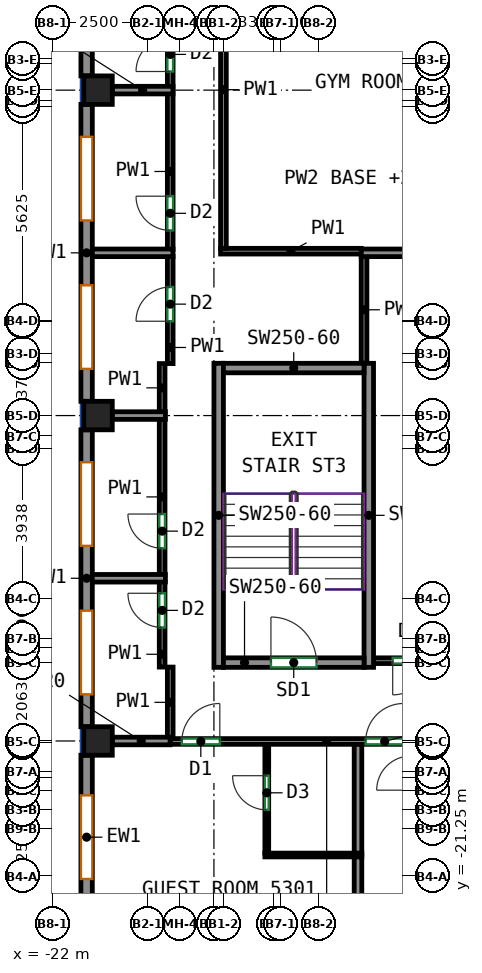
"""IFC4 building model, lengths in metres.
Left out: names, types, materials, properties, quantities, classifications, styles, units other than length and angle.
Written with IfcOpenShell. Run it as: python <this file> out.ifc"""

import sys

from ifc_helpers import new_model, si_unit, direction, frame, frame_2d, origin, origin_2d, place, context, subcontext, project, spatial, rectangle, extrude, source, transform, mapped, element, fill, save


model = new_model("IFC4")
c1 = context("Model", 3, precision=1e-05, world=origin(), true_north=direction((0.0, 1.0)))
c2 = subcontext(c1, "Body", "Model", "MODEL_VIEW")
j1 = project(units=[si_unit("LENGTHUNIT", "METRE"), si_unit("PLANEANGLEUNIT", "RADIAN")], contexts=[c1])
p1 = place(None, origin())
s1 = spatial("IfcSite", under=j1, at=p1, CompositionType="ELEMENT")
p2 = place(p1, origin())
s2 = spatial("IfcBuilding", under=s1, at=p2, CompositionType="ELEMENT")
p3 = place(p2, frame((0.0, 0.0, 216.9)))
s3 = spatial("IfcBuildingStorey", under=s2, at=p3, CompositionType="ELEMENT", Elevation=216.9)
m1 = source(origin(), c2, "Body", "SweptSolid", [
    extrude(rectangle(XDim=0.75, YDim=0.75, at=origin_2d()), origin(), (0.0, 0.0, 1.0), 3.12),
])
for number, where, z_axis, x_axis in (
    (1, (-20.8, -17.688, 0.0), (0.0, 0.0, 1.0), (1.0, 0.0, 0.0)),
    (2, (-20.8, -9.125, 0.0), (0.0, 0.0, 1.0), (1.0, 0.0, 0.0)),
    (3, (-20.8, -0.562, 0.0), (0.0, 0.0, 1.0), (1.0, 0.0, 0.0)),
):
    element("IfcColumn", number, at=place(p3, frame(where, z_axis=z_axis, x_axis=x_axis)), inside=s3, PredefinedType="COLUMN", context=c2, shape_type="MappedRepresentation", body=[
        mapped(m1, transform((0.0, 0.0, 0.0))),
    ])
m2 = source(origin(), c2, "Body", "SweptSolid", [
    extrude(rectangle(XDim=8.0, YDim=0.25, at=frame_2d((4.0, 0.0))), origin(), (0.0, 0.0, 1.0), 3.12),
])
for number, where, z_axis, x_axis in (
    (4, (-17.625, -15.75, 0.0), (0.0, 0.0, 1.0), (0.0, 1.0, 0.0)),
    (5, (-13.675, -15.75, 0.0), (0.0, 0.0, 1.0), (0.0, 1.0, 0.0)),
):
    element("IfcWall", number, at=place(p3, frame(where, z_axis=z_axis, x_axis=x_axis)), inside=s3, PredefinedType="SHEAR", context=c2, shape_type="MappedRepresentation", body=[
        mapped(m2, transform((0.0, 0.0, 0.0))),
    ])
m3 = source(origin(), c2, "Body", "SweptSolid", [
    extrude(rectangle(XDim=3.7, YDim=0.25, at=frame_2d((1.85, 0.0))), origin(), (0.0, 0.0, 1.0), 3.12),
])
p4 = place(p3, frame((-17.5, -15.625, 0.0), z_axis=(0.0, 0.0, 1.0), x_axis=(1.0, 0.0, 0.0)))
e6 = element("IfcWall", 6, at=p4, inside=s3, PredefinedType="SHEAR", context=c2, shape_type="MappedRepresentation", body=[
    mapped(m3, transform((0.0, 0.0, 0.0))),
])
p5 = place(p4, frame((1.25, 0.0, 0.0)))
e7 = element("IfcOpeningElement", 7, at=p5, cuts=e6, PredefinedType="OPENING", context=c2, shape_type="SweptSolid", body=[
    extrude(rectangle(XDim=1.2, YDim=2.1, at=frame_2d((0.6, 1.05))), frame((0.0, 0.135, 0.0), z_axis=(0.0, -1.0, 0.0), x_axis=(1.0, 0.0, 0.0)), (0.0, 0.0, 1.0), 0.27),
])
p6 = place(p3, frame((-17.5, -7.875, 0.0), z_axis=(0.0, 0.0, 1.0), x_axis=(1.0, 0.0, 0.0)))
e8 = element("IfcWall", 8, at=p6, inside=s3, PredefinedType="SHEAR", context=c2, shape_type="MappedRepresentation", body=[
    mapped(m3, transform((0.0, 0.0, 0.0))),
])
m4 = source(origin(), c2, "Body", "SweptSolid", [
    extrude(rectangle(XDim=7.812, YDim=0.3, at=frame_2d((3.906, 0.0))), origin(), (0.0, 0.0, 1.0), 3.12),
])
p7 = place(p3, frame((-21.1, 7.625, 0.0), z_axis=(0.0, 0.0, 1.0), x_axis=(0.0, -1.0, 0.0)))
e9 = element("IfcWall", 9, at=p7, inside=s3, PredefinedType="SOLIDWALL", context=c2, shape_type="MappedRepresentation", body=[
    mapped(m4, transform((0.0, 0.0, 0.0))),
])
p8 = place(p7, frame((0.853, 0.0, 0.85)))
e10 = element("IfcOpeningElement", 10, at=p8, cuts=e9, PredefinedType="OPENING", context=c2, shape_type="SweptSolid", body=[
    extrude(rectangle(XDim=2.2, YDim=1.95, at=frame_2d((1.1, 0.975))), frame((0.0, 0.16, 0.0), z_axis=(0.0, -1.0, 0.0), x_axis=(1.0, 0.0, 0.0)), (0.0, 0.0, 1.0), 0.32),
])
p9 = place(p7, frame((4.759, 0.0, 0.85)))
e11 = element("IfcOpeningElement", 11, at=p9, cuts=e9, PredefinedType="OPENING", context=c2, shape_type="SweptSolid", body=[
    extrude(rectangle(XDim=2.2, YDim=1.95, at=frame_2d((1.1, 0.975))), frame((0.0, 0.16, 0.0), z_axis=(0.0, -1.0, 0.0), x_axis=(1.0, 0.0, 0.0)), (0.0, 0.0, 1.0), 0.32),
])
p10 = place(p3, frame((-21.1, -0.938, 0.0), z_axis=(0.0, 0.0, 1.0), x_axis=(0.0, -1.0, 0.0)))
e12 = element("IfcWall", 12, at=p10, inside=s3, PredefinedType="SOLIDWALL", context=c2, shape_type="MappedRepresentation", body=[
    mapped(m4, transform((0.0, 0.0, 0.0))),
])
p11 = place(p10, frame((0.853, 0.0, 0.85)))
e13 = element("IfcOpeningElement", 13, at=p11, cuts=e12, PredefinedType="OPENING", context=c2, shape_type="SweptSolid", body=[
    extrude(rectangle(XDim=2.2, YDim=1.95, at=frame_2d((1.1, 0.975))), frame((0.0, 0.16, 0.0), z_axis=(0.0, -1.0, 0.0), x_axis=(1.0, 0.0, 0.0)), (0.0, 0.0, 1.0), 0.32),
])
p12 = place(p10, frame((4.76, 0.0, 0.85)))
e14 = element("IfcOpeningElement", 14, at=p12, cuts=e12, PredefinedType="OPENING", context=c2, shape_type="SweptSolid", body=[
    extrude(rectangle(XDim=2.2, YDim=1.95, at=frame_2d((1.1, 0.975))), frame((0.0, 0.16, 0.0), z_axis=(0.0, -1.0, 0.0), x_axis=(1.0, 0.0, 0.0)), (0.0, 0.0, 1.0), 0.32),
])
p13 = place(p3, frame((-21.1, -9.5, 0.0), z_axis=(0.0, 0.0, 1.0), x_axis=(0.0, -1.0, 0.0)))
e15 = element("IfcWall", 15, at=p13, inside=s3, PredefinedType="SOLIDWALL", context=c2, shape_type="MappedRepresentation", body=[
    mapped(m4, transform((0.0, 0.0, 0.0))),
])
p14 = place(p13, frame((0.853, 0.0, 0.85)))
e16 = element("IfcOpeningElement", 16, at=p14, cuts=e15, PredefinedType="OPENING", context=c2, shape_type="SweptSolid", body=[
    extrude(rectangle(XDim=2.2, YDim=1.95, at=frame_2d((1.1, 0.975))), frame((0.0, 0.16, 0.0), z_axis=(0.0, -1.0, 0.0), x_axis=(1.0, 0.0, 0.0)), (0.0, 0.0, 1.0), 0.32),
])
p15 = place(p13, frame((4.759, 0.0, 0.85)))
e17 = element("IfcOpeningElement", 17, at=p15, cuts=e15, PredefinedType="OPENING", context=c2, shape_type="SweptSolid", body=[
    extrude(rectangle(XDim=2.2, YDim=1.95, at=frame_2d((1.1, 0.975))), frame((0.0, 0.16, 0.0), z_axis=(0.0, -1.0, 0.0), x_axis=(1.0, 0.0, 0.0)), (0.0, 0.0, 1.0), 0.32),
])
m5 = source(origin(), c2, "Body", "SweptSolid", [
    extrude(rectangle(XDim=4.312, YDim=0.3, at=frame_2d((2.156, 0.0))), origin(), (0.0, 0.0, 1.0), 3.12),
])
p16 = place(p3, frame((-21.1, -18.062, 0.0), z_axis=(0.0, 0.0, 1.0), x_axis=(0.0, -1.0, 0.0)))
e18 = element("IfcWall", 18, at=p16, inside=s3, PredefinedType="SOLIDWALL", context=c2, shape_type="MappedRepresentation", body=[
    mapped(m5, transform((0.0, 0.0, 0.0))),
])
p17 = place(p16, frame((1.056, 0.0, 0.85)))
e19 = element("IfcOpeningElement", 19, at=p17, cuts=e18, PredefinedType="OPENING", context=c2, shape_type="SweptSolid", body=[
    extrude(rectangle(XDim=2.2, YDim=1.95, at=frame_2d((1.1, 0.975))), frame((0.0, 0.16, 0.0), z_axis=(0.0, -1.0, 0.0), x_axis=(1.0, 0.0, 0.0)), (0.0, 0.0, 1.0), 0.32),
])
p18 = place(p3, frame((-18.9, -17.7, 0.0), z_axis=(0.0, 0.0, 1.0), x_axis=(1.0, 0.0, 0.0)))
e20 = element("IfcWall", 20, at=p18, inside=s3, PredefinedType="PARTITIONING", context=c2, shape_type="SweptSolid", body=[
    extrude(rectangle(XDim=8.233, YDim=0.15, at=frame_2d((4.116, 0.0))), origin(), (0.0, 0.0, 1.0), 2.52),
])
p19 = place(p18, frame((0.305, 0.0, 0.0)))
e21 = element("IfcOpeningElement", 21, at=p19, cuts=e20, PredefinedType="OPENING", context=c2, shape_type="SweptSolid", body=[
    extrude(rectangle(XDim=1.0, YDim=2.1, at=frame_2d((0.5, 1.05))), frame((0.0, 0.085, 0.0), z_axis=(0.0, -1.0, 0.0), x_axis=(1.0, 0.0, 0.0)), (0.0, 0.0, 1.0), 0.17),
])
p20 = place(p18, frame((5.143, 0.0, 0.0)))
e22 = element("IfcOpeningElement", 22, at=p20, cuts=e20, PredefinedType="OPENING", context=c2, shape_type="SweptSolid", body=[
    extrude(rectangle(XDim=1.0, YDim=2.1, at=frame_2d((0.5, 1.05))), frame((0.0, 0.085, 0.0), z_axis=(0.0, -1.0, 0.0), x_axis=(1.0, 0.0, 0.0)), (0.0, 0.0, 1.0), 0.17),
])
p21 = place(p3, frame((-18.9, -17.598, 0.0), z_axis=(0.0, 0.0, 1.0), x_axis=(0.0, 1.0, 0.0)))
e23 = element("IfcWall", 23, at=p21, inside=s3, PredefinedType="PARTITIONING", context=c2, shape_type="SweptSolid", body=[
    extrude(rectangle(XDim=1.855, YDim=0.15, at=frame_2d((0.927, 0.0))), origin(), (0.0, 0.0, 1.0), 3.12),
])
p22 = place(p3, frame((-19.113, -15.743, 0.0), z_axis=(0.0, 0.0, 1.0), x_axis=(0.0, 1.0, 0.0)))
e24 = element("IfcWall", 24, at=p22, inside=s3, PredefinedType="PARTITIONING", context=c2, shape_type="SweptSolid", body=[
    extrude(rectangle(XDim=2.247, YDim=0.15, at=frame_2d((1.124, 0.0))), origin(), (0.0, 0.0, 1.0), 3.12),
])
p23 = place(p22, frame((1.042, 0.0, 0.0)))
e25 = element("IfcOpeningElement", 25, at=p23, cuts=e24, PredefinedType="OPENING", context=c2, shape_type="SweptSolid", body=[
    extrude(rectangle(XDim=0.9, YDim=2.1, at=frame_2d((0.45, 1.05))), frame((0.0, 0.085, 0.0), z_axis=(0.0, -1.0, 0.0), x_axis=(1.0, 0.0, 0.0)), (0.0, 0.0, 1.0), 0.17),
])
p24 = place(p3, frame((-19.113, -13.316, 0.0), z_axis=(0.0, 0.0, 1.0), x_axis=(0.0, 1.0, 0.0)))
e26 = element("IfcWall", 26, at=p24, inside=s3, PredefinedType="PARTITIONING", context=c2, shape_type="SweptSolid", body=[
    extrude(rectangle(XDim=4.101, YDim=0.15, at=frame_2d((2.05, 0.0))), origin(), (0.0, 0.0, 1.0), 3.12),
])
p25 = place(p24, frame((0.7, 0.0, 0.0)))
e27 = element("IfcOpeningElement", 27, at=p25, cuts=e26, PredefinedType="OPENING", context=c2, shape_type="SweptSolid", body=[
    extrude(rectangle(XDim=0.9, YDim=2.1, at=frame_2d((0.45, 1.05))), frame((0.0, 0.085, 0.0), z_axis=(0.0, -1.0, 0.0), x_axis=(1.0, 0.0, 0.0)), (0.0, 0.0, 1.0), 0.17),
])
p26 = place(p3, frame((-18.9, -7.757, 0.0), z_axis=(0.0, 0.0, 1.0), x_axis=(0.0, 1.0, 0.0)))
e28 = element("IfcWall", 28, at=p26, inside=s3, PredefinedType="PARTITIONING", context=c2, shape_type="SweptSolid", body=[
    extrude(rectangle(XDim=2.824, YDim=0.15, at=frame_2d((1.412, 0.0))), origin(), (0.0, 0.0, 1.0), 3.12),
])
p27 = place(p26, frame((1.114, 0.0, 0.0)))
e29 = element("IfcOpeningElement", 29, at=p27, cuts=e28, PredefinedType="OPENING", context=c2, shape_type="SweptSolid", body=[
    extrude(rectangle(XDim=0.9, YDim=2.1, at=frame_2d((0.45, 1.05))), frame((0.0, 0.085, 0.0), z_axis=(0.0, -1.0, 0.0), x_axis=(1.0, 0.0, 0.0)), (0.0, 0.0, 1.0), 0.17),
])
p28 = place(p3, frame((-19.113, -9.035, 0.0), z_axis=(0.0, 0.0, 1.0), x_axis=(0.0, 1.0, 0.0)))
e30 = element("IfcWall", 30, at=p28, inside=s3, PredefinedType="PARTITIONING", context=c2, shape_type="SweptSolid", body=[
    extrude(rectangle(XDim=1.278, YDim=0.15, at=frame_2d((0.639, 0.0))), origin(), (0.0, 0.0, 1.0), 3.12),
])
p29 = place(p3, frame((-18.9, -4.753, 0.0), z_axis=(0.0, 0.0, 1.0), x_axis=(0.0, 1.0, 0.0)))
e31 = element("IfcWall", 31, at=p29, inside=s3, PredefinedType="PARTITIONING", context=c2, shape_type="SweptSolid", body=[
    extrude(rectangle(XDim=4.101, YDim=0.15, at=frame_2d((2.05, 0.0))), origin(), (0.0, 0.0, 1.0), 3.12),
])
p30 = place(p29, frame((0.5, 0.0, 0.0)))
e32 = element("IfcOpeningElement", 32, at=p30, cuts=e31, PredefinedType="OPENING", context=c2, shape_type="SweptSolid", body=[
    extrude(rectangle(XDim=0.9, YDim=2.1, at=frame_2d((0.45, 1.05))), frame((0.0, 0.085, 0.0), z_axis=(0.0, -1.0, 0.0), x_axis=(1.0, 0.0, 0.0)), (0.0, 0.0, 1.0), 0.17),
])
p31 = place(p3, frame((-18.9, -0.472, 0.0), z_axis=(0.0, 0.0, 1.0), x_axis=(0.0, 1.0, 0.0)))
e33 = element("IfcWall", 33, at=p31, inside=s3, PredefinedType="PARTITIONING", context=c2, shape_type="SweptSolid", body=[
    extrude(rectangle(XDim=4.101, YDim=0.15, at=frame_2d((2.05, 0.0))), origin(), (0.0, 0.0, 1.0), 3.12),
])
p32 = place(p31, frame((0.4, 0.0, 0.0)))
e34 = element("IfcOpeningElement", 34, at=p32, cuts=e33, PredefinedType="OPENING", context=c2, shape_type="SweptSolid", body=[
    extrude(rectangle(XDim=0.9, YDim=2.1, at=frame_2d((0.45, 1.05))), frame((0.0, 0.085, 0.0), z_axis=(0.0, -1.0, 0.0), x_axis=(1.0, 0.0, 0.0)), (0.0, 0.0, 1.0), 0.17),
])
p33 = place(p3, frame((-17.575, -4.8, 0.0), z_axis=(0.0, 0.0, 1.0), x_axis=(1.0, 0.0, 0.0)))
e35 = element("IfcWall", 35, at=p33, inside=s3, PredefinedType="PARTITIONING", context=c2, shape_type="SweptSolid", body=[
    extrude(rectangle(XDim=3.702, YDim=0.15, at=frame_2d((1.851, 0.0))), origin(), (0.0, 0.0, 1.0), 3.12),
])
p34 = place(p3, frame((-17.5, -4.725, 0.0), z_axis=(0.0, 0.0, 1.0), x_axis=(0.0, 1.0, 0.0)))
e36 = element("IfcWall", 36, at=p34, inside=s3, PredefinedType="PARTITIONING", context=c2, shape_type="SweptSolid", body=[
    extrude(rectangle(XDim=8.35, YDim=0.15, at=frame_2d((4.175, 0.0))), origin(), (0.0, 0.0, 1.0), 3.12),
])
p35 = place(p3, frame((-13.8, -7.75, 0.0), z_axis=(0.0, 0.0, 1.0), x_axis=(0.0, 1.0, 0.0)))
e37 = element("IfcWall", 37, at=p35, inside=s3, PredefinedType="PARTITIONING", context=c2, shape_type="SweptSolid", body=[
    extrude(rectangle(XDim=2.817, YDim=0.15, at=frame_2d((1.408, 0.0))), origin(), (0.0, 0.0, 1.0), 3.12),
])
p36 = place(p3, frame((-6.365, -15.575, 0.0), z_axis=(0.0, 0.0, 1.0), x_axis=(-1.0, 0.0, 0.0)))
e38 = element("IfcWall", 38, at=p36, inside=s3, PredefinedType="PARTITIONING", context=c2, shape_type="SweptSolid", body=[
    extrude(rectangle(XDim=7.185, YDim=0.15, at=frame_2d((3.593, 0.0))), origin(), (0.0, 0.0, 1.0), 3.12),
])
p37 = place(p36, frame((5.781, 0.0, 0.0)))
e39 = element("IfcOpeningElement", 39, at=p37, cuts=e38, PredefinedType="OPENING", context=c2, shape_type="SweptSolid", body=[
    extrude(rectangle(XDim=0.9, YDim=2.1, at=frame_2d((0.45, 1.05))), frame((0.0, 0.085, 0.0), z_axis=(0.0, -1.0, 0.0), x_axis=(1.0, 0.0, 0.0)), (0.0, 0.0, 1.0), 0.17),
])
p38 = place(p3, frame((-16.359, -20.638, 0.0), z_axis=(0.0, 0.0, 1.0), x_axis=(0.0, 1.0, 0.0)))
e40 = element("IfcWall", 40, at=p38, inside=s3, PredefinedType="PARTITIONING", context=c2, shape_type="SweptSolid", body=[
    extrude(rectangle(XDim=2.861, YDim=0.1, at=frame_2d((1.43, 0.0))), origin(), (0.0, 0.0, 1.0), 3.12),
])
p39 = place(p38, frame((1.137, 0.0, 0.0)))
e41 = element("IfcOpeningElement", 41, at=p39, cuts=e40, PredefinedType="OPENING", context=c2, shape_type="SweptSolid", body=[
    extrude(rectangle(XDim=0.9, YDim=2.1, at=frame_2d((0.45, 1.05))), frame((0.0, 0.06, 0.0), z_axis=(0.0, -1.0, 0.0), x_axis=(1.0, 0.0, 0.0)), (0.0, 0.0, 1.0), 0.12),
])
p40 = place(p3, frame((-16.409, -20.688, 0.0), z_axis=(0.0, 0.0, 1.0), x_axis=(1.0, 0.0, 0.0)))
e42 = element("IfcWall", 42, at=p40, inside=s3, PredefinedType="PARTITIONING", context=c2, shape_type="SweptSolid", body=[
    extrude(rectangle(XDim=2.55, YDim=0.1, at=frame_2d((1.275, 0.0))), origin(), (0.0, 0.0, 1.0), 3.12),
])
p41 = place(p3, frame((-13.959, -26.0, 0.0), z_axis=(0.0, 0.0, 1.0), x_axis=(0.0, 1.0, 0.0)))
e43 = element("IfcWall", 43, at=p41, inside=s3, PredefinedType="PARTITIONING", context=c2, shape_type="SweptSolid", body=[
    extrude(rectangle(XDim=5.262, YDim=0.2, at=frame_2d((2.631, 0.0))), origin(), (0.0, 0.0, 1.0), 3.12),
])
p42 = place(p3, frame((-20.425, -17.688, 0.0), z_axis=(0.0, 0.0, 1.0), x_axis=(1.0, 0.0, 0.0)))
e44 = element("IfcWall", 44, at=p42, inside=s3, PredefinedType="PARTITIONING", context=c2, shape_type="SweptSolid", body=[
    extrude(rectangle(XDim=1.523, YDim=0.2, at=frame_2d((0.761, 0.0))), origin(), (0.0, 0.0, 1.0), 2.52),
])
p43 = place(p3, frame((-13.959, -20.638, 0.0), z_axis=(0.0, 0.0, 1.0), x_axis=(0.0, 1.0, 0.0)))
e45 = element("IfcWall", 45, at=p43, inside=s3, PredefinedType="PARTITIONING", context=c2, shape_type="SweptSolid", body=[
    extrude(rectangle(XDim=2.861, YDim=0.2, at=frame_2d((1.43, 0.0))), origin(), (0.0, 0.0, 1.0), 3.12),
])
p44 = place(p3, frame((-19.027, -13.406, 0.0), z_axis=(0.0, 0.0, 1.0), x_axis=(-1.0, 0.0, 0.0)))
e46 = element("IfcWall", 46, at=p44, inside=s3, PredefinedType="PARTITIONING", context=c2, shape_type="SweptSolid", body=[
    extrude(rectangle(XDim=1.973, YDim=0.2, at=frame_2d((0.986, 0.0))), origin(), (0.0, 0.0, 1.0), 3.12),
])
p45 = place(p3, frame((-20.425, -9.125, 0.0), z_axis=(0.0, 0.0, 1.0), x_axis=(1.0, 0.0, 0.0)))
e47 = element("IfcWall", 47, at=p45, inside=s3, PredefinedType="PARTITIONING", context=c2, shape_type="SweptSolid", body=[
    extrude(rectangle(XDim=1.398, YDim=0.2, at=frame_2d((0.699, 0.0))), origin(), (0.0, 0.0, 1.0), 3.12),
])
p46 = place(p3, frame((-21.0, -4.843, 0.0), z_axis=(0.0, 0.0, 1.0), x_axis=(1.0, 0.0, 0.0)))
e48 = element("IfcWall", 48, at=p46, inside=s3, PredefinedType="PARTITIONING", context=c2, shape_type="SweptSolid", body=[
    extrude(rectangle(XDim=2.173, YDim=0.2, at=frame_2d((1.086, 0.0))), origin(), (0.0, 0.0, 1.0), 3.12),
])
p47 = place(p3, frame((-18.827, -0.562, 0.0), z_axis=(0.0, 0.0, 1.0), x_axis=(-1.0, 0.0, 0.0)))
e49 = element("IfcWall", 49, at=p47, inside=s3, PredefinedType="PARTITIONING", context=c2, shape_type="SweptSolid", body=[
    extrude(rectangle(XDim=1.598, YDim=0.2, at=frame_2d((0.799, 0.0))), origin(), (0.0, 0.0, 1.0), 2.52),
])
p48 = place(p3, frame((-13.873, -4.843, 0.0), z_axis=(0.0, 0.0, 1.0), x_axis=(1.0, 0.0, 0.0)))
e50 = element("IfcWall", 50, at=p48, inside=s3, PredefinedType="PARTITIONING", context=c2, shape_type="SweptSolid", body=[
    extrude(rectangle(XDim=30.146, YDim=0.2, at=frame_2d((15.073, 0.0))), origin(), (0.0, 0.0, 1.0), 3.12),
])
p49 = place(p11, origin())
e51 = element("IfcWindow", 51, at=p49, inside=s3, PartitioningType="SINGLE_PANEL", PredefinedType="WINDOW", context=c2, shape_type="SweptSolid", body=[
    extrude(rectangle(XDim=2.2, YDim=1.95, at=frame_2d((1.1, 0.975))), frame((0.0, 0.03, 0.0), z_axis=(0.0, -1.0, 0.0), x_axis=(1.0, 0.0, 0.0)), (0.0, 0.0, 1.0), 0.06),
])
fill(e13, e51)
p50 = place(p12, origin())
e52 = element("IfcWindow", 52, at=p50, inside=s3, PartitioningType="SINGLE_PANEL", PredefinedType="WINDOW", context=c2, shape_type="SweptSolid", body=[
    extrude(rectangle(XDim=2.2, YDim=1.95, at=frame_2d((1.1, 0.975))), frame((0.0, 0.03, 0.0), z_axis=(0.0, -1.0, 0.0), x_axis=(1.0, 0.0, 0.0)), (0.0, 0.0, 1.0), 0.06),
])
fill(e14, e52)
p51 = place(p14, origin())
e53 = element("IfcWindow", 53, at=p51, inside=s3, PartitioningType="SINGLE_PANEL", PredefinedType="WINDOW", context=c2, shape_type="SweptSolid", body=[
    extrude(rectangle(XDim=2.2, YDim=1.95, at=frame_2d((1.1, 0.975))), frame((0.0, 0.03, 0.0), z_axis=(0.0, -1.0, 0.0), x_axis=(1.0, 0.0, 0.0)), (0.0, 0.0, 1.0), 0.06),
])
fill(e16, e53)
p52 = place(p15, origin())
e54 = element("IfcWindow", 54, at=p52, inside=s3, PartitioningType="SINGLE_PANEL", PredefinedType="WINDOW", context=c2, shape_type="SweptSolid", body=[
    extrude(rectangle(XDim=2.2, YDim=1.95, at=frame_2d((1.1, 0.975))), frame((0.0, 0.03, 0.0), z_axis=(0.0, -1.0, 0.0), x_axis=(1.0, 0.0, 0.0)), (0.0, 0.0, 1.0), 0.06),
])
fill(e17, e54)
p53 = place(p17, origin())
e55 = element("IfcWindow", 55, at=p53, inside=s3, PartitioningType="SINGLE_PANEL", PredefinedType="WINDOW", context=c2, shape_type="SweptSolid", body=[
    extrude(rectangle(XDim=2.2, YDim=1.95, at=frame_2d((1.1, 0.975))), frame((0.0, 0.03, 0.0), z_axis=(0.0, -1.0, 0.0), x_axis=(1.0, 0.0, 0.0)), (0.0, 0.0, 1.0), 0.06),
])
fill(e19, e55)
p54 = place(p5, origin())
e56 = element("IfcDoor", 56, at=p54, inside=s3, OperationType="DOUBLE_DOOR_SINGLE_SWING", PredefinedType="DOOR", context=c2, shape_type="SweptSolid", body=[
    extrude(rectangle(XDim=1.2, YDim=2.1, at=frame_2d((0.6, 1.05))), frame((0.0, 0.025, 0.0), z_axis=(0.0, -1.0, 0.0), x_axis=(1.0, 0.0, 0.0)), (0.0, 0.0, 1.0), 0.05),
])
fill(e7, e56)
p55 = place(p39, origin())
e57 = element("IfcDoor", 57, at=p55, inside=s3, OperationType="SINGLE_SWING_RIGHT", PredefinedType="DOOR", context=c2, shape_type="SweptSolid", body=[
    extrude(rectangle(XDim=0.9, YDim=2.1, at=frame_2d((0.45, 1.05))), frame((0.0, 0.025, 0.0), z_axis=(0.0, -1.0, 0.0), x_axis=(1.0, 0.0, 0.0)), (0.0, 0.0, 1.0), 0.05),
])
fill(e41, e57)
p56 = place(p19, origin())
e58 = element("IfcDoor", 58, at=p56, inside=s3, OperationType="SINGLE_SWING_RIGHT", PredefinedType="DOOR", context=c2, shape_type="SweptSolid", body=[
    extrude(rectangle(XDim=1.0, YDim=2.1, at=frame_2d((0.5, 1.05))), frame((0.0, 0.025, 0.0), z_axis=(0.0, -1.0, 0.0), x_axis=(1.0, 0.0, 0.0)), (0.0, 0.0, 1.0), 0.05),
])
fill(e21, e58)
p57 = place(p20, origin())
e59 = element("IfcDoor", 59, at=p57, inside=s3, OperationType="SINGLE_SWING_RIGHT", PredefinedType="DOOR", context=c2, shape_type="SweptSolid", body=[
    extrude(rectangle(XDim=1.0, YDim=2.1, at=frame_2d((0.5, 1.05))), frame((0.0, 0.025, 0.0), z_axis=(0.0, -1.0, 0.0), x_axis=(1.0, 0.0, 0.0)), (0.0, 0.0, 1.0), 0.05),
])
fill(e22, e59)
p58 = place(p37, origin())
e60 = element("IfcDoor", 60, at=p58, inside=s3, OperationType="SINGLE_SWING_RIGHT", PredefinedType="DOOR", context=c2, shape_type="SweptSolid", body=[
    extrude(rectangle(XDim=0.9, YDim=2.1, at=frame_2d((0.45, 1.05))), frame((0.0, 0.025, 0.0), z_axis=(0.0, -1.0, 0.0), x_axis=(1.0, 0.0, 0.0)), (0.0, 0.0, 1.0), 0.05),
])
fill(e39, e60)
p59 = place(p23, origin())
e61 = element("IfcDoor", 61, at=p59, inside=s3, OperationType="SINGLE_SWING_RIGHT", PredefinedType="DOOR", context=c2, shape_type="SweptSolid", body=[
    extrude(rectangle(XDim=0.9, YDim=2.1, at=frame_2d((0.45, 1.05))), frame((0.0, 0.025, 0.0), z_axis=(0.0, -1.0, 0.0), x_axis=(1.0, 0.0, 0.0)), (0.0, 0.0, 1.0), 0.05),
])
fill(e25, e61)
p60 = place(p25, origin())
e62 = element("IfcDoor", 62, at=p60, inside=s3, OperationType="SINGLE_SWING_RIGHT", PredefinedType="DOOR", context=c2, shape_type="SweptSolid", body=[
    extrude(rectangle(XDim=0.9, YDim=2.1, at=frame_2d((0.45, 1.05))), frame((0.0, 0.025, 0.0), z_axis=(0.0, -1.0, 0.0), x_axis=(1.0, 0.0, 0.0)), (0.0, 0.0, 1.0), 0.05),
])
fill(e27, e62)
p61 = place(p27, origin())
e63 = element("IfcDoor", 63, at=p61, inside=s3, OperationType="SINGLE_SWING_LEFT", PredefinedType="DOOR", context=c2, shape_type="SweptSolid", body=[
    extrude(rectangle(XDim=0.9, YDim=2.1, at=frame_2d((0.45, 1.05))), frame((0.0, 0.025, 0.0), z_axis=(0.0, -1.0, 0.0), x_axis=(1.0, 0.0, 0.0)), (0.0, 0.0, 1.0), 0.05),
])
fill(e29, e63)
p62 = place(p30, origin())
e64 = element("IfcDoor", 64, at=p62, inside=s3, OperationType="SINGLE_SWING_RIGHT", PredefinedType="DOOR", context=c2, shape_type="SweptSolid", body=[
    extrude(rectangle(XDim=0.9, YDim=2.1, at=frame_2d((0.45, 1.05))), frame((0.0, 0.025, 0.0), z_axis=(0.0, -1.0, 0.0), x_axis=(1.0, 0.0, 0.0)), (0.0, 0.0, 1.0), 0.05),
])
fill(e32, e64)
p63 = place(p32, origin())
e65 = element("IfcDoor", 65, at=p63, inside=s3, OperationType="SINGLE_SWING_LEFT", PredefinedType="DOOR", context=c2, shape_type="SweptSolid", body=[
    extrude(rectangle(XDim=0.9, YDim=2.1, at=frame_2d((0.45, 1.05))), frame((0.0, 0.025, 0.0), z_axis=(0.0, -1.0, 0.0), x_axis=(1.0, 0.0, 0.0)), (0.0, 0.0, 1.0), 0.05),
])
fill(e34, e65)
save(model, sys.argv[1])
